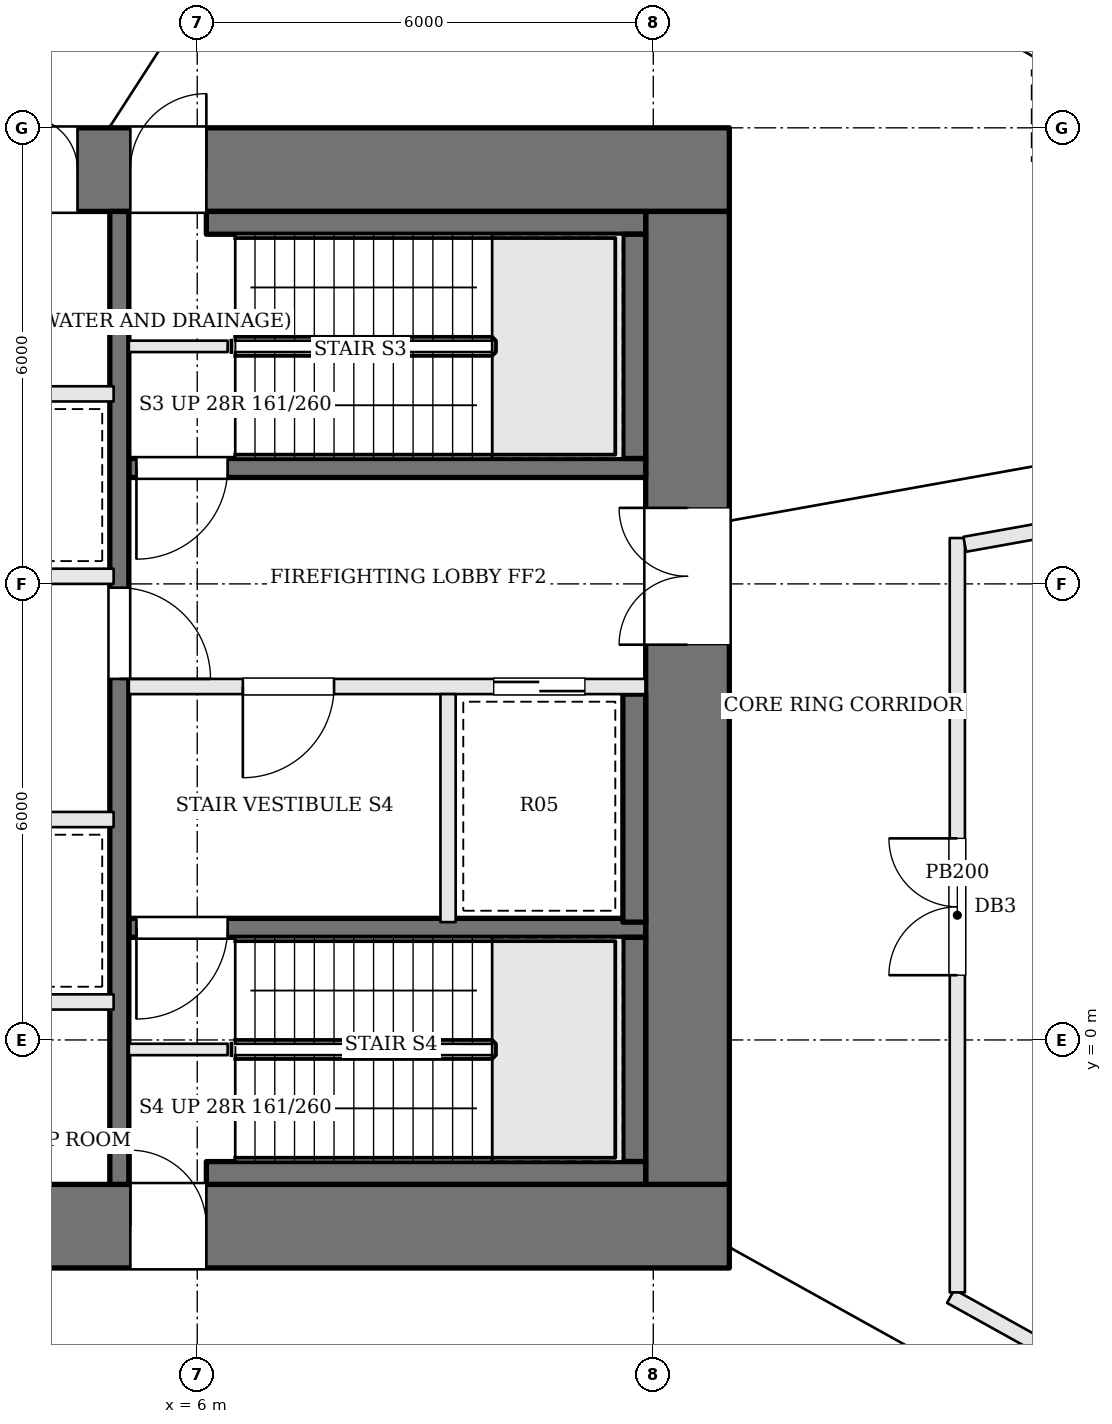
"""IFC4 building model, lengths in metres.
Left out: names, types, materials, properties, quantities, classifications, styles, units other than length and angle.
Written with IfcOpenShell. Run it as: python <this file> out.ifc"""

import sys

from ifc_helpers import new_model, si_unit, direction, frame, frame_2d, origin, origin_2d, place, context, subcontext, project, spatial, rectangle, extrude, element, fill, save


model = new_model("IFC4")
c1 = context("Model", 3, precision=1e-05, world=origin(), true_north=direction((0.0, 1.0)))
c2 = subcontext(c1, "Body", "Model", "MODEL_VIEW")
j1 = project(units=[si_unit("LENGTHUNIT", "METRE"), si_unit("PLANEANGLEUNIT", "RADIAN")], contexts=[c1])
p1 = place(None, origin())
s1 = spatial("IfcSite", under=j1, at=p1, CompositionType="ELEMENT")
p2 = place(p1, origin())
s2 = spatial("IfcBuilding", under=s1, at=p2, CompositionType="ELEMENT")
p3 = place(p2, frame((0.0, 0.0, 121.2)))
s3 = spatial("IfcBuildingStorey", under=s2, at=p3, CompositionType="ELEMENT", Elevation=121.2)
p4 = place(p3, frame((-13.0, 11.45, 0.0), z_axis=(0.0, 0.0, 1.0), x_axis=(1.0, 0.0, 0.0)))
e1 = element("IfcWall", 1, at=p4, inside=s3, PredefinedType="SHEAR", context=c2, shape_type="SweptSolid", body=[
    extrude(rectangle(XDim=26.0, YDim=1.1, at=frame_2d((13.0, 0.0))), origin(), (0.0, 0.0, 1.0), 4.5),
])
p5 = place(p4, frame((8.975, 0.0, 0.0)))
e2 = element("IfcOpeningElement", 2, at=p5, cuts=e1, PredefinedType="OPENING", context=c2, shape_type="SweptSolid", body=[
    extrude(rectangle(XDim=0.7, YDim=2.1, at=frame_2d((0.35, 1.05))), frame((0.0, 0.56, 0.0), z_axis=(0.0, -1.0, 0.0), x_axis=(1.0, 0.0, 0.0)), (0.0, 0.0, 1.0), 1.12),
])
p6 = place(p4, frame((11.575, 0.0, 0.0)))
e3 = element("IfcOpeningElement", 3, at=p6, cuts=e1, PredefinedType="OPENING", context=c2, shape_type="SweptSolid", body=[
    extrude(rectangle(XDim=1.2, YDim=2.1, at=frame_2d((0.6, 1.05))), frame((0.0, 0.56, 0.0), z_axis=(0.0, -1.0, 0.0), x_axis=(1.0, 0.0, 0.0)), (0.0, 0.0, 1.0), 1.12),
])
p7 = place(p4, frame((14.675, 0.0, 0.0)))
e4 = element("IfcOpeningElement", 4, at=p7, cuts=e1, PredefinedType="OPENING", context=c2, shape_type="SweptSolid", body=[
    extrude(rectangle(XDim=0.7, YDim=2.1, at=frame_2d((0.35, 1.05))), frame((0.0, 0.56, 0.0), z_axis=(0.0, -1.0, 0.0), x_axis=(1.0, 0.0, 0.0)), (0.0, 0.0, 1.0), 1.12),
])
p8 = place(p4, frame((16.725, 0.0, 0.0)))
e5 = element("IfcOpeningElement", 5, at=p8, cuts=e1, PredefinedType="OPENING", context=c2, shape_type="SweptSolid", body=[
    extrude(rectangle(XDim=0.7, YDim=2.1, at=frame_2d((0.35, 1.05))), frame((0.0, 0.56, 0.0), z_axis=(0.0, -1.0, 0.0), x_axis=(1.0, 0.0, 0.0)), (0.0, 0.0, 1.0), 1.12),
])
p9 = place(p4, frame((6.88, 0.0, 0.0)))
e6 = element("IfcOpeningElement", 6, at=p9, cuts=e1, PredefinedType="OPENING", context=c2, shape_type="SweptSolid", body=[
    extrude(rectangle(XDim=1.0, YDim=2.1, at=frame_2d((0.5, 1.05))), frame((0.0, 0.56, 0.0), z_axis=(0.0, -1.0, 0.0), x_axis=(1.0, 0.0, 0.0)), (0.0, 0.0, 1.0), 1.12),
])
p10 = place(p4, frame((18.12, 0.0, 0.0)))
e7 = element("IfcOpeningElement", 7, at=p10, cuts=e1, PredefinedType="OPENING", context=c2, shape_type="SweptSolid", body=[
    extrude(rectangle(XDim=1.0, YDim=2.1, at=frame_2d((0.5, 1.05))), frame((0.0, 0.56, 0.0), z_axis=(0.0, -1.0, 0.0), x_axis=(1.0, 0.0, 0.0)), (0.0, 0.0, 1.0), 1.12),
])
p11 = place(p3, frame((-13.0, -2.45, 0.0), z_axis=(0.0, 0.0, 1.0), x_axis=(1.0, 0.0, 0.0)))
e8 = element("IfcWall", 8, at=p11, inside=s3, PredefinedType="SHEAR", context=c2, shape_type="SweptSolid", body=[
    extrude(rectangle(XDim=26.0, YDim=1.1, at=frame_2d((13.0, 0.0))), origin(), (0.0, 0.0, 1.0), 4.5),
])
p12 = place(p11, frame((9.125, 0.0, 0.0)))
e9 = element("IfcOpeningElement", 9, at=p12, cuts=e8, PredefinedType="OPENING", context=c2, shape_type="SweptSolid", body=[
    extrude(rectangle(XDim=1.2, YDim=2.1, at=frame_2d((0.6, 1.05))), frame((0.0, 0.56, 0.0), z_axis=(0.0, -1.0, 0.0), x_axis=(1.0, 0.0, 0.0)), (0.0, 0.0, 1.0), 1.12),
])
p13 = place(p11, frame((12.375, 0.0, 0.0)))
e10 = element("IfcOpeningElement", 10, at=p13, cuts=e8, PredefinedType="OPENING", context=c2, shape_type="SweptSolid", body=[
    extrude(rectangle(XDim=1.2, YDim=2.1, at=frame_2d((0.6, 1.05))), frame((0.0, 0.56, 0.0), z_axis=(0.0, -1.0, 0.0), x_axis=(1.0, 0.0, 0.0)), (0.0, 0.0, 1.0), 1.12),
])
p14 = place(p11, frame((15.65, 0.0, 0.0)))
e11 = element("IfcOpeningElement", 11, at=p14, cuts=e8, PredefinedType="OPENING", context=c2, shape_type="SweptSolid", body=[
    extrude(rectangle(XDim=1.2, YDim=2.1, at=frame_2d((0.6, 1.05))), frame((0.0, 0.56, 0.0), z_axis=(0.0, -1.0, 0.0), x_axis=(1.0, 0.0, 0.0)), (0.0, 0.0, 1.0), 1.12),
])
p15 = place(p11, frame((6.88, 0.0, 0.0)))
e12 = element("IfcOpeningElement", 12, at=p15, cuts=e8, PredefinedType="OPENING", context=c2, shape_type="SweptSolid", body=[
    extrude(rectangle(XDim=1.0, YDim=2.1, at=frame_2d((0.5, 1.05))), frame((0.0, 0.56, 0.0), z_axis=(0.0, -1.0, 0.0), x_axis=(1.0, 0.0, 0.0)), (0.0, 0.0, 1.0), 1.12),
])
p16 = place(p11, frame((18.12, 0.0, 0.0)))
e13 = element("IfcOpeningElement", 13, at=p16, cuts=e8, PredefinedType="OPENING", context=c2, shape_type="SweptSolid", body=[
    extrude(rectangle(XDim=1.0, YDim=2.1, at=frame_2d((0.5, 1.05))), frame((0.0, 0.56, 0.0), z_axis=(0.0, -1.0, 0.0), x_axis=(1.0, 0.0, 0.0)), (0.0, 0.0, 1.0), 1.12),
])
p17 = place(p3, frame((12.45, -1.9, 0.0), z_axis=(0.0, 0.0, 1.0), x_axis=(0.0, 1.0, 0.0)))
e14 = element("IfcWall", 14, at=p17, inside=s3, PredefinedType="SHEAR", context=c2, shape_type="SweptSolid", body=[
    extrude(rectangle(XDim=12.8, YDim=1.1, at=frame_2d((6.4, 0.0))), origin(), (0.0, 0.0, 1.0), 4.5),
])
p18 = place(p17, frame((7.1, 0.0, 0.0)))
e15 = element("IfcOpeningElement", 15, at=p18, cuts=e14, PredefinedType="OPENING", context=c2, shape_type="SweptSolid", body=[
    extrude(rectangle(XDim=1.8, YDim=2.1, at=frame_2d((0.9, 1.05))), frame((0.0, 0.56, 0.0), z_axis=(0.0, -1.0, 0.0), x_axis=(1.0, 0.0, 0.0)), (0.0, 0.0, 1.0), 1.12),
])
p19 = place(p3, frame((19.092, 13.209, -0.549), z_axis=(-0.335632832072, -0.235491775004, 0.912082356995), x_axis=(0.574360318683, -0.818602604639, 0.0)))
e16 = element("IfcColumn", 16, at=p19, inside=s3, PredefinedType="COLUMN", context=c2, shape_type="SweptSolid", body=[
    extrude(rectangle(XDim=1.2, YDim=1.2, at=origin_2d()), origin(), (0.0, 0.0, 1.0), 4.493),
])
for number, where, z_axis, x_axis in (
    (17, (6.4, 9.125, 0.0), (0.0, 0.0, 1.0), (-1.0, 0.0, 0.0)),
    (18, (6.4, -0.125, 0.0), (0.0, 0.0, 1.0), (-1.0, 0.0, 0.0)),
):
    element("IfcWall", number, at=place(p3, frame(where, z_axis=z_axis, x_axis=x_axis)), inside=s3, PredefinedType="SOLIDWALL", context=c2, shape_type="SweptSolid", body=[
        extrude(rectangle(XDim=1.3, YDim=0.15, at=frame_2d((0.65, 0.0))), origin(), (0.0, 0.0, 1.0), 4.3),
    ])
p20 = place(p3, frame((11.9, 7.525, 0.0), z_axis=(0.0, 0.0, 1.0), x_axis=(-1.0, 0.0, 0.0)))
e19 = element("IfcWall", 19, at=p20, inside=s3, PredefinedType="SOLIDWALL", context=c2, shape_type="SweptSolid", body=[
    extrude(rectangle(XDim=6.8, YDim=0.25, at=frame_2d((3.4, 0.0))), origin(), (0.0, 0.0, 1.0), 4.3),
])
p21 = place(p20, frame((5.5, 0.0, 0.0)))
e20 = element("IfcOpeningElement", 20, at=p21, cuts=e19, PredefinedType="OPENING", context=c2, shape_type="SweptSolid", body=[
    extrude(rectangle(XDim=1.2, YDim=2.1, at=frame_2d((0.6, 1.05))), frame((0.0, 0.135, 0.0), z_axis=(0.0, -1.0, 0.0), x_axis=(1.0, 0.0, 0.0)), (0.0, 0.0, 1.0), 0.27),
])
p22 = place(p3, frame((11.9, 4.65, 0.0), z_axis=(0.0, 0.0, 1.0), x_axis=(-1.0, 0.0, 0.0)))
e21 = element("IfcWall", 21, at=p22, inside=s3, PredefinedType="SOLIDWALL", context=c2, shape_type="SweptSolid", body=[
    extrude(rectangle(XDim=6.8, YDim=0.2, at=frame_2d((3.4, 0.0))), origin(), (0.0, 0.0, 1.0), 4.3),
])
p23 = place(p22, frame((4.1, 0.0, 0.0)))
e22 = element("IfcOpeningElement", 22, at=p23, cuts=e21, PredefinedType="OPENING", context=c2, shape_type="SweptSolid", body=[
    extrude(rectangle(XDim=1.2, YDim=2.1, at=frame_2d((0.6, 1.05))), frame((0.0, 0.11, 0.0), z_axis=(0.0, -1.0, 0.0), x_axis=(1.0, 0.0, 0.0)), (0.0, 0.0, 1.0), 0.22),
])
p24 = place(p22, frame((0.8, 0.0, 0.0)))
e23 = element("IfcOpeningElement", 23, at=p24, cuts=e21, PredefinedType="OPENING", context=c2, shape_type="SweptSolid", body=[
    extrude(rectangle(XDim=1.2, YDim=2.1, at=frame_2d((0.6, 1.05))), frame((0.0, 0.11, 0.0), z_axis=(0.0, -1.0, 0.0), x_axis=(1.0, 0.0, 0.0)), (0.0, 0.0, 1.0), 0.22),
])
p25 = place(p3, frame((11.9, 1.475, 0.0), z_axis=(0.0, 0.0, 1.0), x_axis=(-1.0, 0.0, 0.0)))
e24 = element("IfcWall", 24, at=p25, inside=s3, PredefinedType="SOLIDWALL", context=c2, shape_type="SweptSolid", body=[
    extrude(rectangle(XDim=6.8, YDim=0.25, at=frame_2d((3.4, 0.0))), origin(), (0.0, 0.0, 1.0), 4.3),
])
p26 = place(p25, frame((5.5, 0.0, 0.0)))
e25 = element("IfcOpeningElement", 25, at=p26, cuts=e24, PredefinedType="OPENING", context=c2, shape_type="SweptSolid", body=[
    extrude(rectangle(XDim=1.2, YDim=2.1, at=frame_2d((0.6, 1.05))), frame((0.0, 0.135, 0.0), z_axis=(0.0, -1.0, 0.0), x_axis=(1.0, 0.0, 0.0)), (0.0, 0.0, 1.0), 0.27),
])
p27 = place(p3, frame((9.3, 4.55, 0.0), z_axis=(0.0, 0.0, 1.0), x_axis=(0.0, -1.0, 0.0)))
e26 = element("IfcWall", 26, at=p27, inside=s3, PredefinedType="SOLIDWALL", context=c2, shape_type="SweptSolid", body=[
    extrude(rectangle(XDim=3.0, YDim=0.2, at=frame_2d((1.5, 0.0))), origin(), (0.0, 0.0, 1.0), 4.3),
])
p28 = place(p3, frame((4.975, 10.9, 0.0), z_axis=(0.0, 0.0, 1.0), x_axis=(0.0, -1.0, 0.0)))
e27 = element("IfcWall", 27, at=p28, inside=s3, PredefinedType="SOLIDWALL", context=c2, shape_type="SweptSolid", body=[
    extrude(rectangle(XDim=12.8, YDim=0.25, at=frame_2d((6.4, 0.0))), origin(), (0.0, 0.0, 1.0), 4.3),
])
p29 = place(p28, frame((4.95, 0.0, 0.0)))
e28 = element("IfcOpeningElement", 28, at=p29, cuts=e27, PredefinedType="OPENING", context=c2, shape_type="SweptSolid", body=[
    extrude(rectangle(XDim=1.2, YDim=2.1, at=frame_2d((0.6, 1.05))), frame((0.0, 0.135, 0.0), z_axis=(0.0, -1.0, 0.0), x_axis=(1.0, 0.0, 0.0)), (0.0, 0.0, 1.0), 0.27),
])
p30 = place(p3, frame((11.9, 10.75, 0.0), z_axis=(0.0, 0.0, 1.0), x_axis=(-1.0, 0.0, 0.0)))
e29 = element("IfcWall", 29, at=p30, inside=s3, PredefinedType="SOLIDWALL", context=c2, shape_type="SweptSolid", body=[
    extrude(rectangle(XDim=5.78, YDim=0.3, at=frame_2d((2.89, 0.0))), origin(), (0.0, 0.0, 1.0), 4.3),
])
p31 = place(p3, frame((11.75, 10.6, 0.0), z_axis=(0.0, 0.0, 1.0), x_axis=(0.0, -1.0, 0.0)))
e30 = element("IfcWall", 30, at=p31, inside=s3, PredefinedType="SOLIDWALL", context=c2, shape_type="SweptSolid", body=[
    extrude(rectangle(XDim=2.95, YDim=0.3, at=frame_2d((1.475, 0.0))), origin(), (0.0, 0.0, 1.0), 4.3),
])
p32 = place(p3, frame((11.75, 4.55, 0.0), z_axis=(0.0, 0.0, 1.0), x_axis=(0.0, -1.0, 0.0)))
e31 = element("IfcWall", 31, at=p32, inside=s3, PredefinedType="SOLIDWALL", context=c2, shape_type="SweptSolid", body=[
    extrude(rectangle(XDim=3.0, YDim=0.3, at=frame_2d((1.5, 0.0))), origin(), (0.0, 0.0, 1.0), 4.3),
])
p33 = place(p3, frame((11.75, 1.35, 0.0), z_axis=(0.0, 0.0, 1.0), x_axis=(0.0, -1.0, 0.0)))
e32 = element("IfcWall", 32, at=p33, inside=s3, PredefinedType="SOLIDWALL", context=c2, shape_type="SweptSolid", body=[
    extrude(rectangle(XDim=2.95, YDim=0.3, at=frame_2d((1.475, 0.0))), origin(), (0.0, 0.0, 1.0), 4.3),
])
p34 = place(p3, frame((11.9, -1.75, 0.0), z_axis=(0.0, 0.0, 1.0), x_axis=(-1.0, 0.0, 0.0)))
e33 = element("IfcWall", 33, at=p34, inside=s3, PredefinedType="SOLIDWALL", context=c2, shape_type="SweptSolid", body=[
    extrude(rectangle(XDim=5.78, YDim=0.3, at=frame_2d((2.89, 0.0))), origin(), (0.0, 0.0, 1.0), 4.3),
])
for number, where, z_axis, x_axis in (
    (34, (-4.9, 0.5, 0.0), (0.0, 0.0, 1.0), (1.0, 0.0, 0.0)),
    (35, (-4.9, 2.9, 0.0), (0.0, 0.0, 1.0), (1.0, 0.0, 0.0)),
    (36, (-4.9, 6.1, 0.0), (0.0, 0.0, 1.0), (1.0, 0.0, 0.0)),
    (37, (-4.9, 8.5, 0.0), (0.0, 0.0, 1.0), (1.0, 0.0, 0.0)),
):
    element("IfcWall", number, at=place(p3, frame(where, z_axis=z_axis, x_axis=x_axis)), inside=s3, PredefinedType="SOLIDWALL", context=c2, shape_type="SweptSolid", body=[
        extrude(rectangle(XDim=9.8, YDim=0.2, at=frame_2d((4.9, 0.0))), origin(), (0.0, 0.0, 1.0), 4.3),
    ])
p35 = place(p3, frame((20.118, -5.709, 0.0), z_axis=(0.0, 0.0, 1.0), x_axis=(-0.874078265919, 0.4857851223, 0.0)))
e38 = element("IfcWall", 38, at=p35, inside=s3, PredefinedType="PARTITIONING", context=c2, shape_type="SweptSolid", body=[
    extrude(rectangle(XDim=4.811, YDim=0.2, at=frame_2d((2.405, 0.0))), origin(), (0.0, 0.0, 1.0), 4.3),
])
p36 = place(p3, frame((16.0, -3.321, 0.0), z_axis=(0.0, 0.0, 1.0), x_axis=(0.0, 1.0, 0.0)))
e39 = element("IfcWall", 39, at=p36, inside=s3, PredefinedType="PARTITIONING", context=c2, shape_type="SweptSolid", body=[
    extrude(rectangle(XDim=9.924, YDim=0.2, at=frame_2d((4.962, 0.0))), origin(), (0.0, 0.0, 1.0), 4.3),
])
p37 = place(p36, frame((4.173, 0.0, 0.0)))
e40 = element("IfcOpeningElement", 40, at=p37, cuts=e39, PredefinedType="OPENING", context=c2, shape_type="SweptSolid", body=[
    extrude(rectangle(XDim=1.8, YDim=2.1, at=frame_2d((0.9, 1.05))), frame((0.0, 0.11, 0.0), z_axis=(0.0, -1.0, 0.0), x_axis=(1.0, 0.0, 0.0)), (0.0, 0.0, 1.0), 0.22),
])
p38 = place(p3, frame((16.098, 6.521, 0.0), z_axis=(0.0, 0.0, 1.0), x_axis=(0.984311730904, 0.176438137615, 0.0)))
e41 = element("IfcWall", 41, at=p38, inside=s3, PredefinedType="PARTITIONING", context=c2, shape_type="SweptSolid", body=[
    extrude(rectangle(XDim=3.758, YDim=0.2, at=frame_2d((1.879, 0.0))), origin(), (0.0, 0.0, 1.0), 4.3),
])
p39 = place(p18, origin())
e42 = element("IfcDoor", 42, at=p39, inside=s3, OperationType="DOUBLE_DOOR_SINGLE_SWING", PredefinedType="DOOR", context=c2, shape_type="SweptSolid", body=[
    extrude(rectangle(XDim=1.8, YDim=2.1, at=frame_2d((0.9, 1.05))), frame((0.0, 0.025, 0.0), z_axis=(0.0, -1.0, 0.0), x_axis=(1.0, 0.0, 0.0)), (0.0, 0.0, 1.0), 0.05),
])
fill(e15, e42)
p40 = place(p29, origin())
e43 = element("IfcDoor", 43, at=p40, inside=s3, OperationType="SINGLE_SWING_RIGHT", PredefinedType="DOOR", context=c2, shape_type="SweptSolid", body=[
    extrude(rectangle(XDim=1.2, YDim=2.1, at=frame_2d((0.6, 1.05))), frame((0.0, 0.025, 0.0), z_axis=(0.0, -1.0, 0.0), x_axis=(1.0, 0.0, 0.0)), (0.0, 0.0, 1.0), 0.05),
])
fill(e28, e43)
p41 = place(p23, origin())
e44 = element("IfcDoor", 44, at=p41, inside=s3, OperationType="SINGLE_SWING_RIGHT", PredefinedType="DOOR", context=c2, shape_type="SweptSolid", body=[
    extrude(rectangle(XDim=1.2, YDim=2.1, at=frame_2d((0.6, 1.05))), frame((0.0, 0.025, 0.0), z_axis=(0.0, -1.0, 0.0), x_axis=(1.0, 0.0, 0.0)), (0.0, 0.0, 1.0), 0.05),
])
fill(e22, e44)
p42 = place(p21, origin())
e45 = element("IfcDoor", 45, at=p42, inside=s3, OperationType="SINGLE_SWING_RIGHT", PredefinedType="DOOR", context=c2, shape_type="SweptSolid", body=[
    extrude(rectangle(XDim=1.2, YDim=2.1, at=frame_2d((0.6, 1.05))), frame((0.0, 0.025, 0.0), z_axis=(0.0, -1.0, 0.0), x_axis=(1.0, 0.0, 0.0)), (0.0, 0.0, 1.0), 0.05),
])
fill(e20, e45)
p43 = place(p26, origin())
e46 = element("IfcDoor", 46, at=p43, inside=s3, OperationType="SINGLE_SWING_RIGHT", PredefinedType="DOOR", context=c2, shape_type="SweptSolid", body=[
    extrude(rectangle(XDim=1.2, YDim=2.1, at=frame_2d((0.6, 1.05))), frame((0.0, 0.025, 0.0), z_axis=(0.0, -1.0, 0.0), x_axis=(1.0, 0.0, 0.0)), (0.0, 0.0, 1.0), 0.05),
])
fill(e25, e46)
p44 = place(p24, origin())
e47 = element("IfcDoor", 47, at=p44, inside=s3, OperationType="SLIDING_TO_RIGHT", PredefinedType="DOOR", context=c2, shape_type="SweptSolid", body=[
    extrude(rectangle(XDim=1.2, YDim=2.1, at=frame_2d((0.6, 1.05))), frame((0.0, 0.025, 0.0), z_axis=(0.0, -1.0, 0.0), x_axis=(1.0, 0.0, 0.0)), (0.0, 0.0, 1.0), 0.05),
])
fill(e23, e47)
p45 = place(p8, origin())
e48 = element("IfcDoor", 48, at=p45, inside=s3, OperationType="SINGLE_SWING_LEFT", PredefinedType="DOOR", context=c2, shape_type="SweptSolid", body=[
    extrude(rectangle(XDim=0.7, YDim=2.1, at=frame_2d((0.35, 1.05))), frame((0.0, 0.025, 0.0), z_axis=(0.0, -1.0, 0.0), x_axis=(1.0, 0.0, 0.0)), (0.0, 0.0, 1.0), 0.05),
])
fill(e5, e48)
p46 = place(p10, origin())
e49 = element("IfcDoor", 49, at=p46, inside=s3, OperationType="SINGLE_SWING_RIGHT", PredefinedType="DOOR", context=c2, shape_type="SweptSolid", body=[
    extrude(rectangle(XDim=1.0, YDim=2.1, at=frame_2d((0.5, 1.05))), frame((0.0, 0.025, 0.0), z_axis=(0.0, -1.0, 0.0), x_axis=(1.0, 0.0, 0.0)), (0.0, 0.0, 1.0), 0.05),
])
fill(e7, e49)
p47 = place(p16, origin())
e50 = element("IfcDoor", 50, at=p47, inside=s3, OperationType="SINGLE_SWING_LEFT", PredefinedType="DOOR", context=c2, shape_type="SweptSolid", body=[
    extrude(rectangle(XDim=1.0, YDim=2.1, at=frame_2d((0.5, 1.05))), frame((0.0, 0.025, 0.0), z_axis=(0.0, -1.0, 0.0), x_axis=(1.0, 0.0, 0.0)), (0.0, 0.0, 1.0), 0.05),
])
fill(e13, e50)
p48 = place(p37, origin())
e51 = element("IfcDoor", 51, at=p48, inside=s3, OperationType="DOUBLE_DOOR_SINGLE_SWING", PredefinedType="DOOR", context=c2, shape_type="SweptSolid", body=[
    extrude(rectangle(XDim=1.8, YDim=2.1, at=frame_2d((0.9, 1.05))), frame((0.0, 0.025, 0.0), z_axis=(0.0, -1.0, 0.0), x_axis=(1.0, 0.0, 0.0)), (0.0, 0.0, 1.0), 0.05),
])
fill(e40, e51)
save(model, sys.argv[1])
